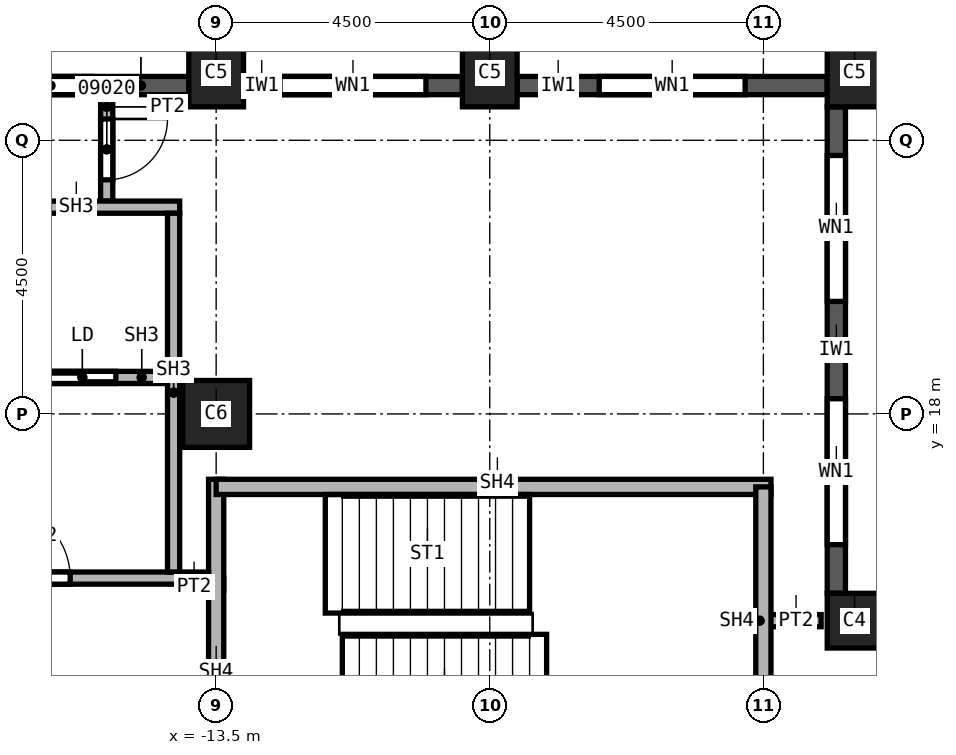
"""IFC4 building model, lengths in metres.
Left out: names, types, materials, properties, quantities, classifications, styles, units other than length and angle.
Written with IfcOpenShell. Run it as: python <this file> out.ifc"""

import sys

from ifc_helpers import new_model, si_unit, direction, frame, frame_2d, origin, origin_2d, place, context, subcontext, project, spatial, rectangle, extrude, element, fill, save


model = new_model("IFC4")
c1 = context("Model", 3, precision=1e-05, world=origin(), true_north=direction((0.0, 1.0)))
c2 = subcontext(c1, "Body", "Model", "MODEL_VIEW")
j1 = project(units=[si_unit("LENGTHUNIT", "METRE"), si_unit("PLANEANGLEUNIT", "RADIAN")], contexts=[c1])
p1 = place(None, origin())
s1 = spatial("IfcSite", under=j1, at=p1, CompositionType="ELEMENT")
p2 = place(p1, origin())
s2 = spatial("IfcBuilding", under=s1, at=p2, CompositionType="ELEMENT")
p3 = place(p2, frame((0.0, 0.0, 166.0)))
s3 = spatial("IfcBuildingStorey", under=s2, at=p3, CompositionType="ELEMENT", Elevation=166.0)
p4 = place(p3, frame((-13.5, 18.0, 0.0), z_axis=(0.0, 0.0, 1.0), x_axis=(1.0, 0.0, 0.0)))
e1 = element("IfcColumn", 1, at=p4, inside=s3, PredefinedType="COLUMN", context=c2, shape_type="SweptSolid", body=[
    extrude(rectangle(XDim=1.1, YDim=1.1, at=origin_2d()), origin(), (0.0, 0.0, 1.0), 3.7),
])
for number, where, z_axis, x_axis in (
    (2, (-3.0, 23.6, 0.0), (0.0, 0.0, 1.0), (1.0, 0.0, 0.0)),
    (3, (-9.0, 23.6, 0.0), (0.0, 0.0, 1.0), (1.0, 0.0, 0.0)),
    (4, (-13.5, 23.6, 0.0), (0.0, 0.0, 1.0), (1.0, 0.0, 0.0)),
):
    element("IfcColumn", number, at=place(p3, frame(where, z_axis=z_axis, x_axis=x_axis)), inside=s3, PredefinedType="COLUMN", context=c2, shape_type="SweptSolid", body=[
        extrude(rectangle(XDim=0.9, YDim=1.1, at=origin_2d()), origin(), (0.0, 0.0, 1.0), 3.7),
    ])
p5 = place(p3, frame((-3.0, 14.6, 0.0), z_axis=(0.0, 0.0, 1.0), x_axis=(1.0, 0.0, 0.0)))
e5 = element("IfcColumn", 5, at=p5, inside=s3, PredefinedType="COLUMN", context=c2, shape_type="SweptSolid", body=[
    extrude(rectangle(XDim=0.9, YDim=0.9, at=origin_2d()), origin(), (0.0, 0.0, 1.0), 3.7),
])
p6 = place(p3, frame((-3.3, 15.05, 0.0), z_axis=(0.0, 0.0, 1.0), x_axis=(0.0, 1.0, 0.0)))
e6 = element("IfcWall", 6, at=p6, inside=s3, PredefinedType="SOLIDWALL", context=c2, shape_type="SweptSolid", body=[
    extrude(rectangle(XDim=8.0, YDim=0.3, at=frame_2d((4.0, 0.0))), origin(), (0.0, 0.0, 1.0), 3.1),
])
p7 = place(p6, frame((0.8, 0.0, 0.8)))
e7 = element("IfcOpeningElement", 7, at=p7, cuts=e6, PredefinedType="OPENING", context=c2, shape_type="SweptSolid", body=[
    extrude(rectangle(XDim=2.4, YDim=1.95, at=frame_2d((1.2, 0.975))), frame((0.0, 0.15, 0.0), z_axis=(0.0, -1.0, 0.0), x_axis=(1.0, 0.0, 0.0)), (0.0, 0.0, 1.0), 0.3),
])
p8 = place(p6, frame((4.8, 0.0, 0.8)))
e8 = element("IfcOpeningElement", 8, at=p8, cuts=e6, PredefinedType="OPENING", context=c2, shape_type="SweptSolid", body=[
    extrude(rectangle(XDim=2.4, YDim=1.95, at=frame_2d((1.2, 0.975))), frame((0.0, 0.15, 0.0), z_axis=(0.0, -1.0, 0.0), x_axis=(1.0, 0.0, 0.0)), (0.0, 0.0, 1.0), 0.3),
])
p9 = place(p3, frame((-3.45, 23.4, 0.0), z_axis=(0.0, 0.0, 1.0), x_axis=(-1.0, 0.0, 0.0)))
e9 = element("IfcWall", 9, at=p9, inside=s3, PredefinedType="SOLIDWALL", context=c2, shape_type="SweptSolid", body=[
    extrude(rectangle(XDim=5.1, YDim=0.3, at=frame_2d((2.55, 0.0))), origin(), (0.0, 0.0, 1.0), 3.1),
])
p10 = place(p9, frame((1.35, 0.0, 0.8)))
e10 = element("IfcOpeningElement", 10, at=p10, cuts=e9, PredefinedType="OPENING", context=c2, shape_type="SweptSolid", body=[
    extrude(rectangle(XDim=2.4, YDim=1.95, at=frame_2d((1.2, 0.975))), frame((0.0, 0.15, 0.0), z_axis=(0.0, -1.0, 0.0), x_axis=(1.0, 0.0, 0.0)), (0.0, 0.0, 1.0), 0.3),
])
p11 = place(p3, frame((-9.45, 23.4, 0.0), z_axis=(0.0, 0.0, 1.0), x_axis=(-1.0, 0.0, 0.0)))
e11 = element("IfcWall", 11, at=p11, inside=s3, PredefinedType="SOLIDWALL", context=c2, shape_type="SweptSolid", body=[
    extrude(rectangle(XDim=3.6, YDim=0.3, at=frame_2d((1.8, 0.0))), origin(), (0.0, 0.0, 1.0), 3.1),
])
p12 = place(p11, frame((0.6, 0.0, 0.8)))
e12 = element("IfcOpeningElement", 12, at=p12, cuts=e11, PredefinedType="OPENING", context=c2, shape_type="SweptSolid", body=[
    extrude(rectangle(XDim=2.4, YDim=1.95, at=frame_2d((1.2, 0.975))), frame((0.0, 0.15, 0.0), z_axis=(0.0, -1.0, 0.0), x_axis=(1.0, 0.0, 0.0)), (0.0, 0.0, 1.0), 0.3),
])
p13 = place(p3, frame((-13.95, 23.4, 0.0), z_axis=(0.0, 0.0, 1.0), x_axis=(-1.0, 0.0, 0.0)))
e13 = element("IfcWall", 13, at=p13, inside=s3, PredefinedType="SOLIDWALL", context=c2, shape_type="SweptSolid", body=[
    extrude(rectangle(XDim=3.6, YDim=0.3, at=frame_2d((1.8, 0.0))), origin(), (0.0, 0.0, 1.0), 3.1),
])
p14 = place(p13, frame((1.575, 0.0, 0.8)))
e14 = element("IfcOpeningElement", 14, at=p14, cuts=e13, PredefinedType="OPENING", context=c2, shape_type="SweptSolid", body=[
    extrude(rectangle(XDim=1.4, YDim=1.95, at=frame_2d((0.7, 0.975))), frame((0.0, 0.15, 0.0), z_axis=(0.0, -1.0, 0.0), x_axis=(1.0, 0.0, 0.0)), (0.0, 0.0, 1.0), 0.3),
])
p15 = place(p3, frame((-15.3, 23.25, 0.0), z_axis=(0.0, 0.0, 1.0), x_axis=(0.0, -1.0, 0.0)))
e15 = element("IfcWall", 15, at=p15, inside=s3, PredefinedType="PARTITIONING", context=c2, shape_type="SweptSolid", body=[
    extrude(rectangle(XDim=1.75, YDim=0.2, at=frame_2d((0.875, 0.0))), origin(), (0.0, 0.0, 1.0), 3.7),
])
p16 = place(p15, frame((0.4, 0.0, 0.0)))
e16 = element("IfcOpeningElement", 16, at=p16, cuts=e15, PredefinedType="OPENING", context=c2, shape_type="SweptSolid", body=[
    extrude(rectangle(XDim=1.0, YDim=2.1, at=frame_2d((0.5, 1.05))), frame((0.0, 0.1, 0.0), z_axis=(0.0, -1.0, 0.0), x_axis=(1.0, 0.0, 0.0)), (0.0, 0.0, 1.0), 0.2),
])
p17 = place(p3, frame((-14.1, 15.2, 0.0), z_axis=(0.0, 0.0, 1.0), x_axis=(1.0, 0.0, 0.0)))
e17 = element("IfcWall", 17, at=p17, inside=s3, PredefinedType="PARTITIONING", context=c2, shape_type="SweptSolid", body=[
    extrude(rectangle(XDim=0.725, YDim=0.2, at=frame_2d((0.363, 0.0))), origin(), (0.0, 0.0, 1.0), 3.7),
])
p18 = place(p3, frame((-4.5, 14.6, 0.0), z_axis=(0.0, 0.0, 1.0), x_axis=(1.0, 0.0, 0.0)))
e18 = element("IfcWall", 18, at=p18, inside=s3, PredefinedType="PARTITIONING", context=c2, shape_type="SweptSolid", body=[
    extrude(rectangle(XDim=0.95, YDim=0.2, at=frame_2d((0.475, 0.0))), origin(), (0.0, 0.0, 1.0), 3.7),
])
p19 = place(p3, frame((-13.5, 12.175, 0.0), z_axis=(0.0, 0.0, 1.0), x_axis=(0.0, 1.0, 0.0)))
e19 = element("IfcWall", 19, at=p19, inside=s3, PredefinedType="SOLIDWALL", context=c2, shape_type="SweptSolid", body=[
    extrude(rectangle(XDim=4.75, YDim=0.25, at=frame_2d((2.375, 0.0))), origin(), (0.0, 0.0, 1.0), 3.7),
])
p20 = place(p3, frame((-13.5, 16.8, 0.0), z_axis=(0.0, 0.0, 1.0), x_axis=(1.0, 0.0, 0.0)))
e20 = element("IfcWall", 20, at=p20, inside=s3, PredefinedType="SOLIDWALL", context=c2, shape_type="SweptSolid", body=[
    extrude(rectangle(XDim=9.125, YDim=0.25, at=frame_2d((4.562, 0.0))), origin(), (0.0, 0.0, 1.0), 3.7),
])
p21 = place(p3, frame((-4.5, 16.8, 0.0), z_axis=(0.0, 0.0, 1.0), x_axis=(0.0, -1.0, 0.0)))
e21 = element("IfcWall", 21, at=p21, inside=s3, PredefinedType="SOLIDWALL", context=c2, shape_type="SweptSolid", body=[
    extrude(rectangle(XDim=4.5, YDim=0.25, at=frame_2d((2.25, 0.0))), origin(), (0.0, 0.0, 1.0), 3.7),
])
p22 = place(p3, frame((-21.9, 15.3, 0.0), z_axis=(0.0, 0.0, 1.0), x_axis=(1.0, 0.0, 0.0)))
e22 = element("IfcWall", 22, at=p22, inside=s3, PredefinedType="SOLIDWALL", context=c2, shape_type="SweptSolid", body=[
    extrude(rectangle(XDim=8.275, YDim=0.2, at=frame_2d((4.137, 0.0))), origin(), (0.0, 0.0, 1.0), 3.7),
])
p23 = place(p22, frame((4.8, 0.0, 0.0)))
e23 = element("IfcOpeningElement", 23, at=p23, cuts=e22, PredefinedType="OPENING", context=c2, shape_type="SweptSolid", body=[
    extrude(rectangle(XDim=1.2, YDim=2.1, at=frame_2d((0.6, 1.05))), frame((0.0, 0.1, 0.0), z_axis=(0.0, -1.0, 0.0), x_axis=(1.0, 0.0, 0.0)), (0.0, 0.0, 1.0), 0.2),
])
p24 = place(p3, frame((-21.9, 21.4, 0.0), z_axis=(0.0, 0.0, 1.0), x_axis=(1.0, 0.0, 0.0)))
e24 = element("IfcWall", 24, at=p24, inside=s3, PredefinedType="SOLIDWALL", context=c2, shape_type="SweptSolid", body=[
    extrude(rectangle(XDim=7.8, YDim=0.2, at=frame_2d((3.9, 0.0))), origin(), (0.0, 0.0, 1.0), 3.7),
])
p25 = place(p24, frame((3.2, 0.0, 0.0)))
e25 = element("IfcOpeningElement", 25, at=p25, cuts=e24, PredefinedType="OPENING", context=c2, shape_type="SweptSolid", body=[
    extrude(rectangle(XDim=1.2, YDim=2.1, at=frame_2d((0.6, 1.05))), frame((0.0, 0.1, 0.0), z_axis=(0.0, -1.0, 0.0), x_axis=(1.0, 0.0, 0.0)), (0.0, 0.0, 1.0), 0.2),
])
p26 = place(p3, frame((-14.2, 15.4, 0.0), z_axis=(0.0, 0.0, 1.0), x_axis=(0.0, 1.0, 0.0)))
e26 = element("IfcWall", 26, at=p26, inside=s3, PredefinedType="SOLIDWALL", context=c2, shape_type="SweptSolid", body=[
    extrude(rectangle(XDim=5.9, YDim=0.2, at=frame_2d((2.95, 0.0))), origin(), (0.0, 0.0, 1.0), 3.7),
])
p27 = place(p3, frame((-17.1, 18.6, 0.0), z_axis=(0.0, 0.0, 1.0), x_axis=(1.0, 0.0, 0.0)))
e27 = element("IfcWall", 27, at=p27, inside=s3, PredefinedType="SOLIDWALL", context=c2, shape_type="SweptSolid", body=[
    extrude(rectangle(XDim=2.8, YDim=0.2, at=frame_2d((1.4, 0.0))), origin(), (0.0, 0.0, 1.0), 3.7),
])
p28 = place(p27, frame((0.85, 0.0, 0.0)))
e28 = element("IfcOpeningElement", 28, at=p28, cuts=e27, PredefinedType="OPENING", context=c2, shape_type="SweptSolid", body=[
    extrude(rectangle(XDim=1.1, YDim=2.1, at=frame_2d((0.55, 1.05))), frame((0.0, 0.1, 0.0), z_axis=(0.0, -1.0, 0.0), x_axis=(1.0, 0.0, 0.0)), (0.0, 0.0, 1.0), 0.2),
])
p29 = place(p7, origin())
e29 = element("IfcWindow", 29, at=p29, inside=s3, PartitioningType="SINGLE_PANEL", PredefinedType="WINDOW", context=c2, shape_type="SweptSolid", body=[
    extrude(rectangle(XDim=2.4, YDim=1.95, at=frame_2d((1.2, 0.975))), frame((0.0, 0.03, 0.0), z_axis=(0.0, -1.0, 0.0), x_axis=(1.0, 0.0, 0.0)), (0.0, 0.0, 1.0), 0.06),
])
fill(e7, e29)
p30 = place(p8, origin())
e30 = element("IfcWindow", 30, at=p30, inside=s3, PartitioningType="SINGLE_PANEL", PredefinedType="WINDOW", context=c2, shape_type="SweptSolid", body=[
    extrude(rectangle(XDim=2.4, YDim=1.95, at=frame_2d((1.2, 0.975))), frame((0.0, 0.03, 0.0), z_axis=(0.0, -1.0, 0.0), x_axis=(1.0, 0.0, 0.0)), (0.0, 0.0, 1.0), 0.06),
])
fill(e8, e30)
p31 = place(p10, origin())
e31 = element("IfcWindow", 31, at=p31, inside=s3, PartitioningType="SINGLE_PANEL", PredefinedType="WINDOW", context=c2, shape_type="SweptSolid", body=[
    extrude(rectangle(XDim=2.4, YDim=1.95, at=frame_2d((1.2, 0.975))), frame((0.0, 0.03, 0.0), z_axis=(0.0, -1.0, 0.0), x_axis=(1.0, 0.0, 0.0)), (0.0, 0.0, 1.0), 0.06),
])
fill(e10, e31)
p32 = place(p12, origin())
e32 = element("IfcWindow", 32, at=p32, inside=s3, PartitioningType="SINGLE_PANEL", PredefinedType="WINDOW", context=c2, shape_type="SweptSolid", body=[
    extrude(rectangle(XDim=2.4, YDim=1.95, at=frame_2d((1.2, 0.975))), frame((0.0, 0.03, 0.0), z_axis=(0.0, -1.0, 0.0), x_axis=(1.0, 0.0, 0.0)), (0.0, 0.0, 1.0), 0.06),
])
fill(e12, e32)
p33 = place(p16, origin())
e33 = element("IfcDoor", 33, at=p33, inside=s3, OperationType="SINGLE_SWING_LEFT", PredefinedType="DOOR", context=c2, shape_type="SweptSolid", body=[
    extrude(rectangle(XDim=1.0, YDim=2.1, at=frame_2d((0.5, 1.05))), frame((0.0, 0.025, 0.0), z_axis=(0.0, -1.0, 0.0), x_axis=(1.0, 0.0, 0.0)), (0.0, 0.0, 1.0), 0.05),
])
fill(e16, e33)
p34 = place(p28, origin())
e34 = element("IfcDoor", 34, at=p34, inside=s3, OperationType="SLIDING_TO_LEFT", PredefinedType="DOOR", context=c2, shape_type="SweptSolid", body=[
    extrude(rectangle(XDim=1.1, YDim=2.1, at=frame_2d((0.55, 1.05))), frame((0.0, 0.025, 0.0), z_axis=(0.0, -1.0, 0.0), x_axis=(1.0, 0.0, 0.0)), (0.0, 0.0, 1.0), 0.05),
])
fill(e28, e34)
p35 = place(p23, origin())
e35 = element("IfcDoor", 35, at=p35, inside=s3, OperationType="SINGLE_SWING_RIGHT", PredefinedType="DOOR", context=c2, shape_type="SweptSolid", body=[
    extrude(rectangle(XDim=1.2, YDim=2.1, at=frame_2d((0.6, 1.05))), frame((0.0, 0.025, 0.0), z_axis=(0.0, -1.0, 0.0), x_axis=(1.0, 0.0, 0.0)), (0.0, 0.0, 1.0), 0.05),
])
fill(e23, e35)
p36 = place(p14, origin())
e36 = element("IfcWindow", 36, at=p36, inside=s3, PartitioningType="SINGLE_PANEL", PredefinedType="WINDOW", context=c2, shape_type="SweptSolid", body=[
    extrude(rectangle(XDim=1.4, YDim=1.95, at=frame_2d((0.7, 0.975))), frame((0.0, 0.03, 0.0), z_axis=(0.0, -1.0, 0.0), x_axis=(1.0, 0.0, 0.0)), (0.0, 0.0, 1.0), 0.06),
])
fill(e14, e36)
save(model, sys.argv[1])
